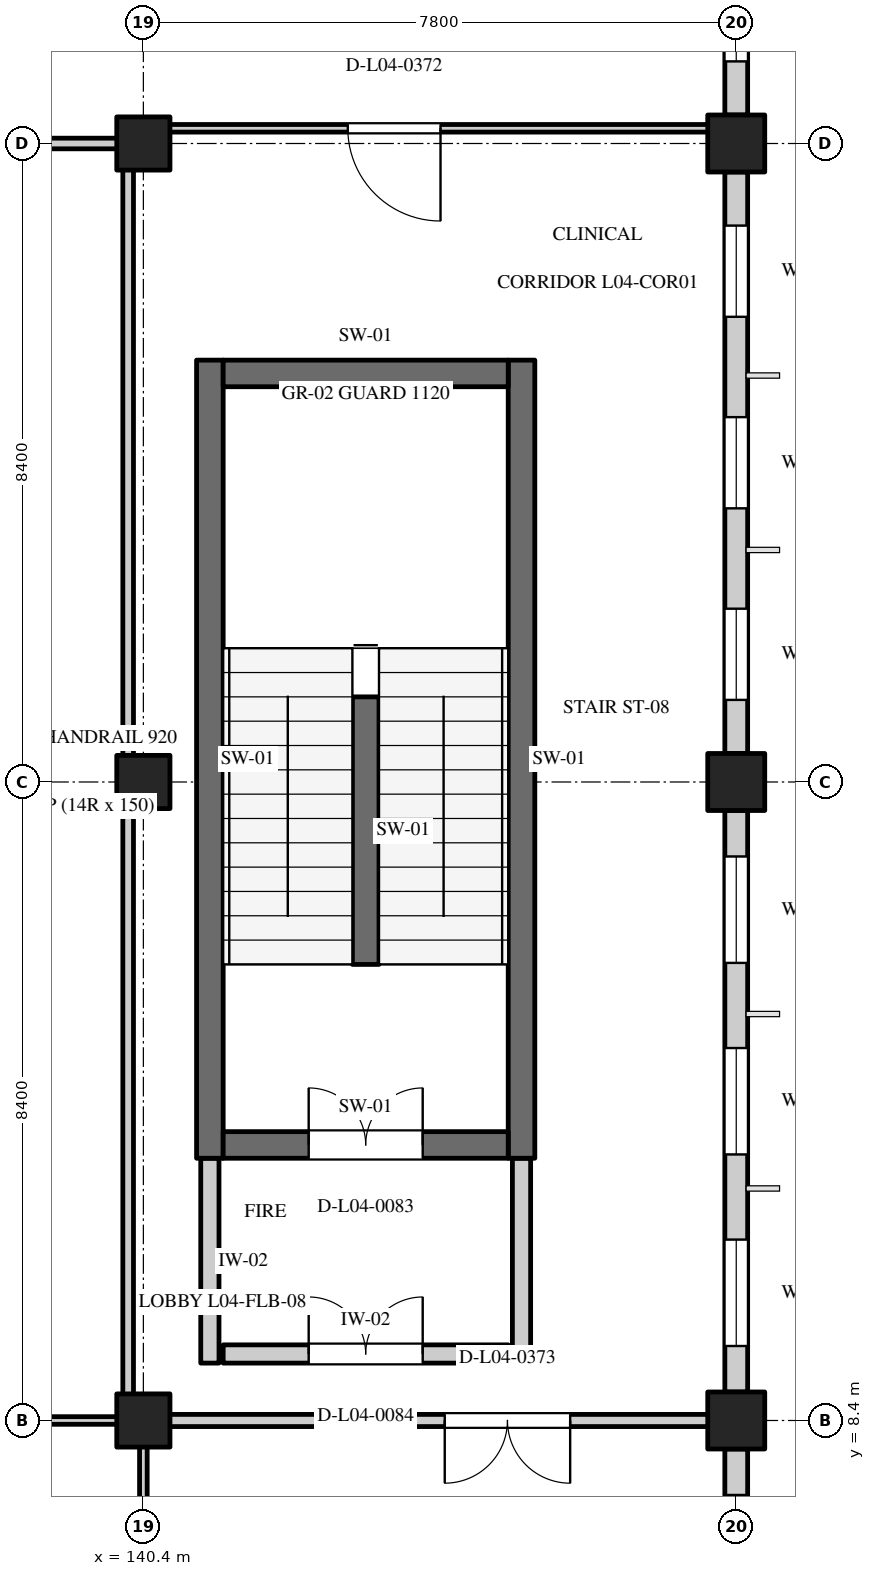
"""IFC4 building model, lengths in metres.
Left out: names, types, materials, properties, quantities, classifications, styles, units other than length and angle.
Written with IfcOpenShell. Run it as: python <this file> out.ifc"""

import sys

from ifc_helpers import new_model, si_unit, direction, frame, frame_2d, origin, origin_2d, place, context, subcontext, project, spatial, rectangle, extrude, element, fill, save


model = new_model("IFC4")
c1 = context("Model", 3, precision=1e-05, world=origin(), true_north=direction((0.0, 1.0)))
c2 = subcontext(c1, "Body", "Model", "MODEL_VIEW")
j1 = project(units=[si_unit("LENGTHUNIT", "METRE"), si_unit("PLANEANGLEUNIT", "RADIAN")], contexts=[c1])
p1 = place(None, origin())
s1 = spatial("IfcSite", under=j1, at=p1, CompositionType="ELEMENT")
p2 = place(p1, origin())
s2 = spatial("IfcBuilding", under=s1, at=p2, CompositionType="ELEMENT")
p3 = place(p2, frame((0.0, 0.0, 18.0)))
s3 = spatial("IfcBuildingStorey", under=s2, at=p3, CompositionType="ELEMENT", Elevation=18.0)
for number, where, z_axis, x_axis in (
    (1, (140.4, 8.4, 0.0), (0.0, 0.0, 1.0), (1.0, 0.0, 0.0)),
    (2, (140.4, 16.8, 0.0), (0.0, 0.0, 1.0), (1.0, 0.0, 0.0)),
    (3, (140.4, 25.2, 0.0), (0.0, 0.0, 1.0), (1.0, 0.0, 0.0)),
):
    element("IfcColumn", number, at=place(p3, frame(where, z_axis=z_axis, x_axis=x_axis)), inside=s3, PredefinedType="COLUMN", context=c2, shape_type="SweptSolid", body=[
        extrude(rectangle(XDim=0.7, YDim=0.7, at=origin_2d()), origin(), (0.0, 0.0, 1.0), 4.2),
    ])
for number, where, z_axis, x_axis in (
    (4, (148.2, 8.4, 0.0), (0.0, 0.0, 1.0), (1.0, 0.0, 0.0)),
    (5, (148.2, 16.8, 0.0), (0.0, 0.0, 1.0), (1.0, 0.0, 0.0)),
    (6, (148.2, 25.2, 0.0), (0.0, 0.0, 1.0), (1.0, 0.0, 0.0)),
):
    element("IfcColumn", number, at=place(p3, frame(where, z_axis=z_axis, x_axis=x_axis)), inside=s3, PredefinedType="COLUMN", context=c2, shape_type="SweptSolid", body=[
        extrude(rectangle(XDim=0.75, YDim=0.75, at=origin_2d()), origin(), (0.0, 0.0, 1.0), 4.2),
    ])
p4 = place(p3, frame((148.2, 0.375, 0.0), z_axis=(0.0, 0.0, 1.0), x_axis=(0.0, 1.0, 0.0)))
e7 = element("IfcWall", 7, at=p4, inside=s3, PredefinedType="STANDARD", context=c2, shape_type="SweptSolid", body=[
    extrude(rectangle(XDim=7.65, YDim=0.3, at=frame_2d((3.825, 0.0))), origin(), (0.0, 0.0, 1.0), 3.235),
])
p5 = place(p4, frame((0.605, 0.0, 0.8)))
e8 = element("IfcOpeningElement", 8, at=p5, cuts=e7, PredefinedType="OPENING", context=c2, shape_type="SweptSolid", body=[
    extrude(rectangle(XDim=1.4, YDim=1.6, at=frame_2d((0.7, 0.8))), frame((0.0, 0.162, 0.0), z_axis=(0.0, -1.0, 0.0), x_axis=(1.0, 0.0, 0.0)), (0.0, 0.0, 1.0), 0.324),
])
p6 = place(p4, frame((3.125, 0.0, 0.8)))
e9 = element("IfcOpeningElement", 9, at=p6, cuts=e7, PredefinedType="OPENING", context=c2, shape_type="SweptSolid", body=[
    extrude(rectangle(XDim=1.4, YDim=1.6, at=frame_2d((0.7, 0.8))), frame((0.0, 0.162, 0.0), z_axis=(0.0, -1.0, 0.0), x_axis=(1.0, 0.0, 0.0)), (0.0, 0.0, 1.0), 0.324),
])
p7 = place(p4, frame((5.645, 0.0, 0.8)))
e10 = element("IfcOpeningElement", 10, at=p7, cuts=e7, PredefinedType="OPENING", context=c2, shape_type="SweptSolid", body=[
    extrude(rectangle(XDim=1.4, YDim=1.6, at=frame_2d((0.7, 0.8))), frame((0.0, 0.162, 0.0), z_axis=(0.0, -1.0, 0.0), x_axis=(1.0, 0.0, 0.0)), (0.0, 0.0, 1.0), 0.324),
])
p8 = place(p3, frame((148.2, 8.775, 0.0), z_axis=(0.0, 0.0, 1.0), x_axis=(0.0, 1.0, 0.0)))
e11 = element("IfcWall", 11, at=p8, inside=s3, PredefinedType="STANDARD", context=c2, shape_type="SweptSolid", body=[
    extrude(rectangle(XDim=7.65, YDim=0.3, at=frame_2d((3.825, 0.0))), origin(), (0.0, 0.0, 1.0), 3.235),
])
p9 = place(p8, frame((0.605, 0.0, 0.8)))
e12 = element("IfcOpeningElement", 12, at=p9, cuts=e11, PredefinedType="OPENING", context=c2, shape_type="SweptSolid", body=[
    extrude(rectangle(XDim=1.4, YDim=1.45, at=frame_2d((0.7, 0.725))), frame((0.0, 0.162, 0.0), z_axis=(0.0, -1.0, 0.0), x_axis=(1.0, 0.0, 0.0)), (0.0, 0.0, 1.0), 0.324),
])
p10 = place(p8, frame((3.125, 0.0, 0.8)))
e13 = element("IfcOpeningElement", 13, at=p10, cuts=e11, PredefinedType="OPENING", context=c2, shape_type="SweptSolid", body=[
    extrude(rectangle(XDim=1.4, YDim=1.45, at=frame_2d((0.7, 0.725))), frame((0.0, 0.162, 0.0), z_axis=(0.0, -1.0, 0.0), x_axis=(1.0, 0.0, 0.0)), (0.0, 0.0, 1.0), 0.324),
])
p11 = place(p8, frame((5.645, 0.0, 0.8)))
e14 = element("IfcOpeningElement", 14, at=p11, cuts=e11, PredefinedType="OPENING", context=c2, shape_type="SweptSolid", body=[
    extrude(rectangle(XDim=1.4, YDim=1.45, at=frame_2d((0.7, 0.725))), frame((0.0, 0.162, 0.0), z_axis=(0.0, -1.0, 0.0), x_axis=(1.0, 0.0, 0.0)), (0.0, 0.0, 1.0), 0.324),
])
p12 = place(p3, frame((148.2, 17.175, 0.0), z_axis=(0.0, 0.0, 1.0), x_axis=(0.0, 1.0, 0.0)))
e15 = element("IfcWall", 15, at=p12, inside=s3, PredefinedType="STANDARD", context=c2, shape_type="SweptSolid", body=[
    extrude(rectangle(XDim=7.65, YDim=0.3, at=frame_2d((3.825, 0.0))), origin(), (0.0, 0.0, 1.0), 3.235),
])
p13 = place(p12, frame((0.705, 0.0, 0.8)))
e16 = element("IfcOpeningElement", 16, at=p13, cuts=e15, PredefinedType="OPENING", context=c2, shape_type="SweptSolid", body=[
    extrude(rectangle(XDim=1.2, YDim=1.55, at=frame_2d((0.6, 0.775))), frame((0.0, 0.162, 0.0), z_axis=(0.0, -1.0, 0.0), x_axis=(1.0, 0.0, 0.0)), (0.0, 0.0, 1.0), 0.324),
])
p14 = place(p12, frame((3.225, 0.0, 0.8)))
e17 = element("IfcOpeningElement", 17, at=p14, cuts=e15, PredefinedType="OPENING", context=c2, shape_type="SweptSolid", body=[
    extrude(rectangle(XDim=1.2, YDim=1.55, at=frame_2d((0.6, 0.775))), frame((0.0, 0.162, 0.0), z_axis=(0.0, -1.0, 0.0), x_axis=(1.0, 0.0, 0.0)), (0.0, 0.0, 1.0), 0.324),
])
p15 = place(p12, frame((5.745, 0.0, 0.8)))
e18 = element("IfcOpeningElement", 18, at=p15, cuts=e15, PredefinedType="OPENING", context=c2, shape_type="SweptSolid", body=[
    extrude(rectangle(XDim=1.2, YDim=1.55, at=frame_2d((0.6, 0.775))), frame((0.0, 0.162, 0.0), z_axis=(0.0, -1.0, 0.0), x_axis=(1.0, 0.0, 0.0)), (0.0, 0.0, 1.0), 0.324),
])
p16 = place(p3, frame((148.2, 25.575, 0.0), z_axis=(0.0, 0.0, 1.0), x_axis=(0.0, 1.0, 0.0)))
e19 = element("IfcWall", 19, at=p16, inside=s3, PredefinedType="STANDARD", context=c2, shape_type="SweptSolid", body=[
    extrude(rectangle(XDim=7.65, YDim=0.3, at=frame_2d((3.825, 0.0))), origin(), (0.0, 0.0, 1.0), 3.235),
])
p17 = place(p16, frame((0.705, 0.0, 0.8)))
e20 = element("IfcOpeningElement", 20, at=p17, cuts=e19, PredefinedType="OPENING", context=c2, shape_type="SweptSolid", body=[
    extrude(rectangle(XDim=1.2, YDim=1.4, at=frame_2d((0.6, 0.7))), frame((0.0, 0.162, 0.0), z_axis=(0.0, -1.0, 0.0), x_axis=(1.0, 0.0, 0.0)), (0.0, 0.0, 1.0), 0.324),
])
p18 = place(p16, frame((3.225, 0.0, 0.8)))
e21 = element("IfcOpeningElement", 21, at=p18, cuts=e19, PredefinedType="OPENING", context=c2, shape_type="SweptSolid", body=[
    extrude(rectangle(XDim=1.2, YDim=1.4, at=frame_2d((0.6, 0.7))), frame((0.0, 0.162, 0.0), z_axis=(0.0, -1.0, 0.0), x_axis=(1.0, 0.0, 0.0)), (0.0, 0.0, 1.0), 0.324),
])
p19 = place(p16, frame((5.745, 0.0, 0.8)))
e22 = element("IfcOpeningElement", 22, at=p19, cuts=e19, PredefinedType="OPENING", context=c2, shape_type="SweptSolid", body=[
    extrude(rectangle(XDim=1.2, YDim=1.4, at=frame_2d((0.6, 0.7))), frame((0.0, 0.162, 0.0), z_axis=(0.0, -1.0, 0.0), x_axis=(1.0, 0.0, 0.0)), (0.0, 0.0, 1.0), 0.324),
])
for number, where, z_axis, x_axis in (
    (23, (141.275, 11.85, 0.0), (0.0, 0.0, 1.0), (0.0, 1.0, 0.0)),
    (24, (145.375, 11.85, 0.0), (0.0, 0.0, 1.0), (0.0, 1.0, 0.0)),
):
    element("IfcWall", number, at=place(p3, frame(where, z_axis=z_axis, x_axis=x_axis)), inside=s3, PredefinedType="SHEAR", context=c2, shape_type="SweptSolid", body=[
        extrude(rectangle(XDim=10.5, YDim=0.35, at=frame_2d((5.25, 0.0))), origin(), (0.0, 0.0, 1.0), 4.2),
    ])
p20 = place(p3, frame((141.45, 22.175, 0.0), z_axis=(0.0, 0.0, 1.0), x_axis=(1.0, 0.0, 0.0)))
e25 = element("IfcWall", 25, at=p20, inside=s3, PredefinedType="SHEAR", context=c2, shape_type="SweptSolid", body=[
    extrude(rectangle(XDim=3.75, YDim=0.35, at=frame_2d((1.875, 0.0))), origin(), (0.0, 0.0, 1.0), 4.2),
])
p21 = place(p3, frame((141.45, 12.025, 0.0), z_axis=(0.0, 0.0, 1.0), x_axis=(1.0, 0.0, 0.0)))
e26 = element("IfcWall", 26, at=p21, inside=s3, PredefinedType="SHEAR", context=c2, shape_type="SweptSolid", body=[
    extrude(rectangle(XDim=3.75, YDim=0.35, at=frame_2d((1.875, 0.0))), origin(), (0.0, 0.0, 1.0), 3.885),
])
p22 = place(p21, frame((1.125, 0.0, 0.0)))
e27 = element("IfcOpeningElement", 27, at=p22, cuts=e26, PredefinedType="OPENING", context=c2, shape_type="SweptSolid", body=[
    extrude(rectangle(XDim=1.5, YDim=2.2, at=frame_2d((0.75, 1.1))), frame((0.0, 0.187, 0.0), z_axis=(0.0, -1.0, 0.0), x_axis=(1.0, 0.0, 0.0)), (0.0, 0.0, 1.0), 0.374),
])
for number, where, z_axis, x_axis in (
    (28, (141.275, 9.155, 0.0), (0.0, 0.0, 1.0), (0.0, 1.0, 0.0)),
    (29, (145.375, 9.155, 0.0), (0.0, 0.0, 1.0), (0.0, 1.0, 0.0)),
):
    element("IfcWall", number, at=place(p3, frame(where, z_axis=z_axis, x_axis=x_axis)), inside=s3, PredefinedType="STANDARD", context=c2, shape_type="SweptSolid", body=[
        extrude(rectangle(XDim=2.695, YDim=0.24, at=frame_2d((1.348, 0.0))), origin(), (0.0, 0.0, 1.0), 3.885),
    ])
p23 = place(p3, frame((141.45, 9.275, 0.0), z_axis=(0.0, 0.0, 1.0), x_axis=(1.0, 0.0, 0.0)))
e30 = element("IfcWall", 30, at=p23, inside=s3, PredefinedType="STANDARD", context=c2, shape_type="SweptSolid", body=[
    extrude(rectangle(XDim=3.75, YDim=0.24, at=frame_2d((1.875, 0.0))), origin(), (0.0, 0.0, 1.0), 3.885),
])
p24 = place(p23, frame((1.125, 0.0, 0.0)))
e31 = element("IfcOpeningElement", 31, at=p24, cuts=e30, PredefinedType="OPENING", context=c2, shape_type="SweptSolid", body=[
    extrude(rectangle(XDim=1.5, YDim=2.2, at=frame_2d((0.75, 1.1))), frame((0.0, 0.132, 0.0), z_axis=(0.0, -1.0, 0.0), x_axis=(1.0, 0.0, 0.0)), (0.0, 0.0, 1.0), 0.264),
])
p25 = place(p3, frame((143.325, 14.4, 0.0), z_axis=(0.0, 0.0, 1.0), x_axis=(0.0, 1.0, 0.0)))
e32 = element("IfcWall", 32, at=p25, inside=s3, PredefinedType="SHEAR", context=c2, shape_type="SweptSolid", body=[
    extrude(rectangle(XDim=3.52, YDim=0.35, at=frame_2d((1.76, 0.0))), origin(), (0.0, 0.0, 1.0), 4.2),
])
p26 = place(p3, frame((132.29, 8.4, 0.0), z_axis=(0.0, 0.0, 1.0), x_axis=(1.0, 0.0, 0.0)))
e33 = element("IfcWall", 33, at=p26, inside=s3, PredefinedType="PARTITIONING", context=c2, shape_type="SweptSolid", body=[
    extrude(rectangle(XDim=8.025, YDim=0.1, at=frame_2d((4.012, 0.0))), origin(), (0.0, 0.0, 1.0), 3.865),
])
p27 = place(p26, frame((2.964, 0.0, 0.0)))
e34 = element("IfcOpeningElement", 34, at=p27, cuts=e33, PredefinedType="OPENING", context=c2, shape_type="SweptSolid", body=[
    extrude(rectangle(XDim=1.05, YDim=2.1, at=frame_2d((0.525, 1.05))), frame((0.0, 0.062, 0.0), z_axis=(0.0, -1.0, 0.0), x_axis=(1.0, 0.0, 0.0)), (0.0, 0.0, 1.0), 0.124),
])
p28 = place(p3, frame((140.4, 0.085, 0.0), z_axis=(0.0, 0.0, 1.0), x_axis=(0.0, 1.0, 0.0)))
e35 = element("IfcWall", 35, at=p28, inside=s3, PredefinedType="PARTITIONING", context=c2, shape_type="SweptSolid", body=[
    extrude(rectangle(XDim=8.23, YDim=0.1, at=frame_2d((4.115, 0.0))), origin(), (0.0, 0.0, 1.0), 3.865),
])
p29 = place(p3, frame((132.685, 25.2, 0.0), z_axis=(0.0, 0.0, 1.0), x_axis=(1.0, 0.0, 0.0)))
e36 = element("IfcWall", 36, at=p29, inside=s3, PredefinedType="PARTITIONING", context=c2, shape_type="SweptSolid", body=[
    extrude(rectangle(XDim=7.43, YDim=0.14, at=frame_2d((3.715, 0.0))), origin(), (0.0, 0.0, 1.0), 3.235),
])
p30 = place(p29, frame((2.618, 0.0, 0.0)))
e37 = element("IfcOpeningElement", 37, at=p30, cuts=e36, PredefinedType="OPENING", context=c2, shape_type="SweptSolid", body=[
    extrude(rectangle(XDim=1.12, YDim=2.2, at=frame_2d((0.56, 1.1))), frame((0.0, 0.082, 0.0), z_axis=(0.0, -1.0, 0.0), x_axis=(1.0, 0.0, 0.0)), (0.0, 0.0, 1.0), 0.164),
])
p31 = place(p3, frame((140.2, 8.485, 0.0), z_axis=(0.0, 0.0, 1.0), x_axis=(0.0, 1.0, 0.0)))
e38 = element("IfcWall", 38, at=p31, inside=s3, PredefinedType="PARTITIONING", context=c2, shape_type="SweptSolid", body=[
    extrude(rectangle(XDim=16.63, YDim=0.14, at=frame_2d((8.315, 0.0))), origin(), (0.0, 0.0, 1.0), 3.865),
])
p32 = place(p3, frame((140.155, 25.4, 0.0), z_axis=(0.0, 0.0, 1.0), x_axis=(1.0, 0.0, 0.0)))
e39 = element("IfcWall", 39, at=p32, inside=s3, PredefinedType="PARTITIONING", context=c2, shape_type="SweptSolid", body=[
    extrude(rectangle(XDim=7.76, YDim=0.1, at=frame_2d((3.88, 0.0))), origin(), (0.0, 0.0, 1.0), 3.235),
])
p33 = place(p32, frame((2.934, 0.0, 0.0)))
e40 = element("IfcOpeningElement", 40, at=p33, cuts=e39, PredefinedType="OPENING", context=c2, shape_type="SweptSolid", body=[
    extrude(rectangle(XDim=1.22, YDim=2.15, at=frame_2d((0.61, 1.075))), frame((0.0, 0.062, 0.0), z_axis=(0.0, -1.0, 0.0), x_axis=(1.0, 0.0, 0.0)), (0.0, 0.0, 1.0), 0.124),
])
p34 = place(p3, frame((140.485, 8.4, 0.0), z_axis=(0.0, 0.0, 1.0), x_axis=(1.0, 0.0, 0.0)))
e41 = element("IfcWall", 41, at=p34, inside=s3, PredefinedType="PARTITIONING", context=c2, shape_type="SweptSolid", body=[
    extrude(rectangle(XDim=7.43, YDim=0.16, at=frame_2d((3.715, 0.0))), origin(), (0.0, 0.0, 1.0), 3.865),
])
p35 = place(p34, frame((3.88, 0.0, 0.0)))
e42 = element("IfcOpeningElement", 42, at=p35, cuts=e41, PredefinedType="OPENING", context=c2, shape_type="SweptSolid", body=[
    extrude(rectangle(XDim=1.65, YDim=2.25, at=frame_2d((0.825, 1.125))), frame((0.0, 0.092, 0.0), z_axis=(0.0, -1.0, 0.0), x_axis=(1.0, 0.0, 0.0)), (0.0, 0.0, 1.0), 0.184),
])
p36 = place(p7, origin())
e43 = element("IfcWindow", 43, at=p36, inside=s3, PartitioningType="SINGLE_PANEL", PredefinedType="WINDOW", context=c2, shape_type="SweptSolid", body=[
    extrude(rectangle(XDim=1.4, YDim=1.6, at=frame_2d((0.7, 0.8))), frame((0.0, 0.03, 0.0), z_axis=(0.0, -1.0, 0.0), x_axis=(1.0, 0.0, 0.0)), (0.0, 0.0, 1.0), 0.06),
])
fill(e10, e43)
p37 = place(p9, origin())
e44 = element("IfcWindow", 44, at=p37, inside=s3, PartitioningType="SINGLE_PANEL", PredefinedType="WINDOW", context=c2, shape_type="SweptSolid", body=[
    extrude(rectangle(XDim=1.4, YDim=1.45, at=frame_2d((0.7, 0.725))), frame((0.0, 0.03, 0.0), z_axis=(0.0, -1.0, 0.0), x_axis=(1.0, 0.0, 0.0)), (0.0, 0.0, 1.0), 0.06),
])
fill(e12, e44)
p38 = place(p10, origin())
e45 = element("IfcWindow", 45, at=p38, inside=s3, PartitioningType="SINGLE_PANEL", PredefinedType="WINDOW", context=c2, shape_type="SweptSolid", body=[
    extrude(rectangle(XDim=1.4, YDim=1.45, at=frame_2d((0.7, 0.725))), frame((0.0, 0.03, 0.0), z_axis=(0.0, -1.0, 0.0), x_axis=(1.0, 0.0, 0.0)), (0.0, 0.0, 1.0), 0.06),
])
fill(e13, e45)
p39 = place(p11, origin())
e46 = element("IfcWindow", 46, at=p39, inside=s3, PartitioningType="SINGLE_PANEL", PredefinedType="WINDOW", context=c2, shape_type="SweptSolid", body=[
    extrude(rectangle(XDim=1.4, YDim=1.45, at=frame_2d((0.7, 0.725))), frame((0.0, 0.03, 0.0), z_axis=(0.0, -1.0, 0.0), x_axis=(1.0, 0.0, 0.0)), (0.0, 0.0, 1.0), 0.06),
])
fill(e14, e46)
p40 = place(p13, origin())
e47 = element("IfcWindow", 47, at=p40, inside=s3, PartitioningType="SINGLE_PANEL", PredefinedType="WINDOW", context=c2, shape_type="SweptSolid", body=[
    extrude(rectangle(XDim=1.2, YDim=1.55, at=frame_2d((0.6, 0.775))), frame((0.0, 0.03, 0.0), z_axis=(0.0, -1.0, 0.0), x_axis=(1.0, 0.0, 0.0)), (0.0, 0.0, 1.0), 0.06),
])
fill(e16, e47)
p41 = place(p14, origin())
e48 = element("IfcWindow", 48, at=p41, inside=s3, PartitioningType="SINGLE_PANEL", PredefinedType="WINDOW", context=c2, shape_type="SweptSolid", body=[
    extrude(rectangle(XDim=1.2, YDim=1.55, at=frame_2d((0.6, 0.775))), frame((0.0, 0.03, 0.0), z_axis=(0.0, -1.0, 0.0), x_axis=(1.0, 0.0, 0.0)), (0.0, 0.0, 1.0), 0.06),
])
fill(e17, e48)
p42 = place(p15, origin())
e49 = element("IfcWindow", 49, at=p42, inside=s3, PartitioningType="SINGLE_PANEL", PredefinedType="WINDOW", context=c2, shape_type="SweptSolid", body=[
    extrude(rectangle(XDim=1.2, YDim=1.55, at=frame_2d((0.6, 0.775))), frame((0.0, 0.03, 0.0), z_axis=(0.0, -1.0, 0.0), x_axis=(1.0, 0.0, 0.0)), (0.0, 0.0, 1.0), 0.06),
])
fill(e18, e49)
p43 = place(p17, origin())
e50 = element("IfcWindow", 50, at=p43, inside=s3, PartitioningType="SINGLE_PANEL", PredefinedType="WINDOW", context=c2, shape_type="SweptSolid", body=[
    extrude(rectangle(XDim=1.2, YDim=1.4, at=frame_2d((0.6, 0.7))), frame((0.0, 0.03, 0.0), z_axis=(0.0, -1.0, 0.0), x_axis=(1.0, 0.0, 0.0)), (0.0, 0.0, 1.0), 0.06),
])
fill(e20, e50)
p44 = place(p22, origin())
e51 = element("IfcDoor", 51, at=p44, inside=s3, OperationType="DOUBLE_DOOR_SINGLE_SWING", PredefinedType="DOOR", context=c2, shape_type="SweptSolid", body=[
    extrude(rectangle(XDim=1.5, YDim=2.2, at=frame_2d((0.75, 1.1))), frame((0.0, 0.025, 0.0), z_axis=(0.0, -1.0, 0.0), x_axis=(1.0, 0.0, 0.0)), (0.0, 0.0, 1.0), 0.05),
])
fill(e27, e51)
p45 = place(p24, origin())
e52 = element("IfcDoor", 52, at=p45, inside=s3, OperationType="DOUBLE_DOOR_SINGLE_SWING", PredefinedType="DOOR", context=c2, shape_type="SweptSolid", body=[
    extrude(rectangle(XDim=1.5, YDim=2.2, at=frame_2d((0.75, 1.1))), frame((0.0, 0.025, 0.0), z_axis=(0.0, -1.0, 0.0), x_axis=(1.0, 0.0, 0.0)), (0.0, 0.0, 1.0), 0.05),
])
fill(e31, e52)
p46 = place(p33, origin())
e53 = element("IfcDoor", 53, at=p46, inside=s3, OperationType="SINGLE_SWING_RIGHT", PredefinedType="DOOR", context=c2, shape_type="SweptSolid", body=[
    extrude(rectangle(XDim=1.22, YDim=2.15, at=frame_2d((0.61, 1.075))), frame((0.0, 0.025, 0.0), z_axis=(0.0, -1.0, 0.0), x_axis=(1.0, 0.0, 0.0)), (0.0, 0.0, 1.0), 0.05),
])
fill(e40, e53)
p47 = place(p35, frame((1.65, 0.0, 0.0), z_axis=(0.0, 0.0, 1.0), x_axis=(-1.0, 0.0, 0.0)))
e54 = element("IfcDoor", 54, at=p47, inside=s3, OperationType="DOUBLE_DOOR_SINGLE_SWING", PredefinedType="DOOR", context=c2, shape_type="SweptSolid", body=[
    extrude(rectangle(XDim=1.65, YDim=2.25, at=frame_2d((0.825, 1.125))), frame((0.0, 0.025, 0.0), z_axis=(0.0, -1.0, 0.0), x_axis=(1.0, 0.0, 0.0)), (0.0, 0.0, 1.0), 0.05),
])
fill(e42, e54)
save(model, sys.argv[1])
